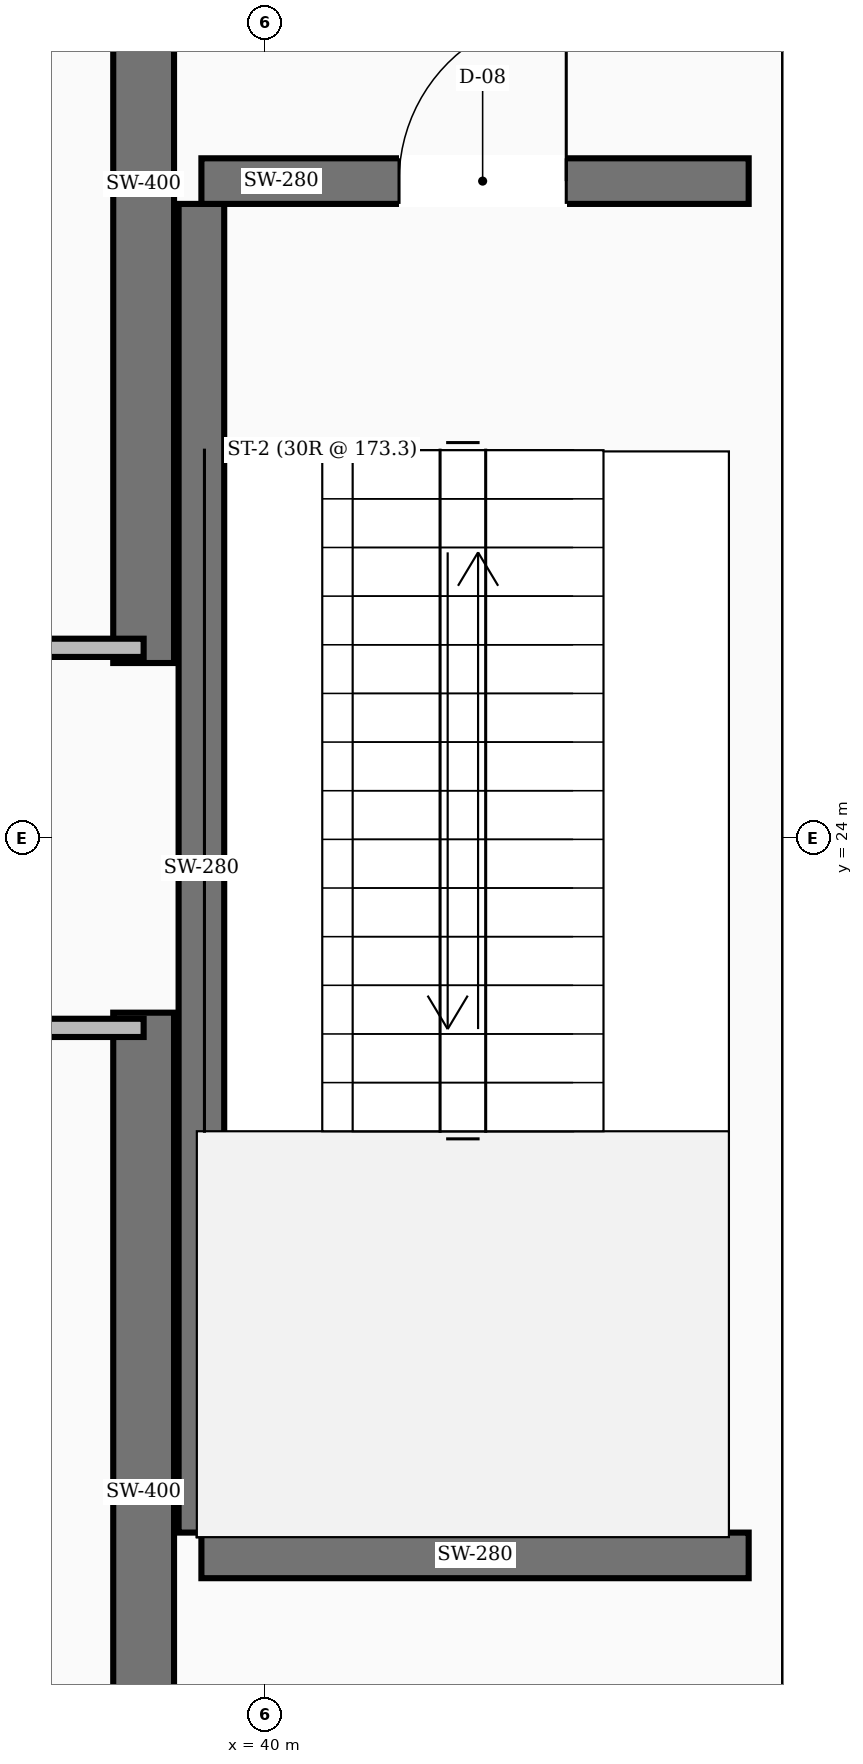
"""IFC4 building model, lengths in metres.
Left out: names, types, materials, properties, quantities, classifications, styles, units other than length and angle.
Written with IfcOpenShell. Run it as: python <this file> out.ifc"""

import sys

from ifc_helpers import new_model, si_unit, direction, frame, frame_2d, origin, place, context, subcontext, project, spatial, rectangle, extrude, element, fill, save


model = new_model("IFC4")
c1 = context("Model", 3, precision=1e-05, world=origin(), true_north=direction((0.0, 1.0)))
c2 = subcontext(c1, "Body", "Model", "MODEL_VIEW")
j1 = project(units=[si_unit("LENGTHUNIT", "METRE"), si_unit("PLANEANGLEUNIT", "RADIAN")], contexts=[c1])
p1 = place(None, origin())
s1 = spatial("IfcSite", under=j1, at=p1, CompositionType="ELEMENT")
p2 = place(p1, origin())
s2 = spatial("IfcBuilding", under=s1, at=p2, CompositionType="ELEMENT")
p3 = place(p2, frame((0.0, 0.0, -10.4)))
s3 = spatial("IfcBuildingStorey", under=s2, at=p3, CompositionType="ELEMENT", Elevation=-10.4)
for number, where, z_axis, x_axis in (
    (1, (39.2, 16.55, 0.0), (0.0, 0.0, 1.0), (0.0, 1.0, 0.0)),
    (2, (39.2, 25.15, 0.0), (0.0, 0.0, 1.0), (0.0, 1.0, 0.0)),
):
    element("IfcWall", number, at=place(p3, frame(where, z_axis=z_axis, x_axis=x_axis)), inside=s3, PredefinedType="SHEAR", context=c2, shape_type="SweptSolid", body=[
        extrude(rectangle(XDim=6.3, YDim=0.4, at=frame_2d((3.15, 0.0))), origin(), (0.0, 0.0, 1.0), 5.2),
    ])
for number, where, z_axis, x_axis in (
    (3, (43.18, 19.43, 0.0), (0.0, 0.0, 1.0), (0.0, 1.0, 0.0)),
    (4, (39.58, 19.43, 0.0), (0.0, 0.0, 1.0), (0.0, 1.0, 0.0)),
):
    element("IfcWall", number, at=place(p3, frame(where, z_axis=z_axis, x_axis=x_axis)), inside=s3, PredefinedType="SHEAR", context=c2, shape_type="SweptSolid", body=[
        extrude(rectangle(XDim=8.74, YDim=0.3, at=frame_2d((4.37, 0.0))), origin(), (0.0, 0.0, 1.0), 5.2),
    ])
p4 = place(p3, frame((39.58, 19.28, 0.0), z_axis=(0.0, 0.0, 1.0), x_axis=(1.0, 0.0, 0.0)))
e5 = element("IfcWall", 5, at=p4, inside=s3, PredefinedType="SHEAR", context=c2, shape_type="SweptSolid", body=[
    extrude(rectangle(XDim=3.6, YDim=0.3, at=frame_2d((1.8, 0.0))), origin(), (0.0, 0.0, 1.0), 5.2),
])
p5 = place(p3, frame((39.58, 28.32, 0.0), z_axis=(0.0, 0.0, 1.0), x_axis=(1.0, 0.0, 0.0)))
e6 = element("IfcWall", 6, at=p5, inside=s3, PredefinedType="SHEAR", context=c2, shape_type="SweptSolid", body=[
    extrude(rectangle(XDim=3.6, YDim=0.3, at=frame_2d((1.8, 0.0))), origin(), (0.0, 0.0, 1.0), 5.2),
])
p6 = place(p5, frame((1.3, 0.0, 0.0)))
e7 = element("IfcOpeningElement", 7, at=p6, cuts=e6, PredefinedType="OPENING", context=c2, shape_type="SweptSolid", body=[
    extrude(rectangle(XDim=1.1, YDim=2.1, at=frame_2d((0.55, 1.05))), frame((0.0, 0.16, 0.0), z_axis=(0.0, -1.0, 0.0), x_axis=(1.0, 0.0, 0.0)), (0.0, 0.0, 1.0), 0.32),
])
p7 = place(p3, frame((43.18, 28.32, 0.0), z_axis=(0.0, 0.0, 1.0), x_axis=(0.0, 1.0, 0.0)))
e8 = element("IfcWall", 8, at=p7, inside=s3, PredefinedType="SOLIDWALL", context=c2, shape_type="SweptSolid", body=[
    extrude(rectangle(XDim=3.13, YDim=0.2, at=frame_2d((1.565, 0.0))), origin(), (0.0, 0.0, 1.0), 3.9),
])
p8 = place(p7, frame((1.015, 0.0, 0.0)))
e9 = element("IfcOpeningElement", 9, at=p8, cuts=e8, PredefinedType="OPENING", context=c2, shape_type="SweptSolid", body=[
    extrude(rectangle(XDim=1.1, YDim=2.1, at=frame_2d((0.55, 1.05))), frame((0.0, 0.11, 0.0), z_axis=(0.0, -1.0, 0.0), x_axis=(1.0, 0.0, 0.0)), (0.0, 0.0, 1.0), 0.22),
])
p9 = place(p3, frame((43.18, 16.55, 0.0), z_axis=(0.0, 0.0, 1.0), x_axis=(0.0, 1.0, 0.0)))
e10 = element("IfcWall", 10, at=p9, inside=s3, PredefinedType="SOLIDWALL", context=c2, shape_type="SweptSolid", body=[
    extrude(rectangle(XDim=2.73, YDim=0.2, at=frame_2d((1.365, 0.0))), origin(), (0.0, 0.0, 1.0), 3.9),
])
p10 = place(p9, frame((0.89, 0.0, 0.0)))
e11 = element("IfcOpeningElement", 11, at=p10, cuts=e10, PredefinedType="OPENING", context=c2, shape_type="SweptSolid", body=[
    extrude(rectangle(XDim=0.95, YDim=2.1, at=frame_2d((0.475, 1.05))), frame((0.0, 0.11, 0.0), z_axis=(0.0, -1.0, 0.0), x_axis=(1.0, 0.0, 0.0)), (0.0, 0.0, 1.0), 0.22),
])
for number, where, z_axis, x_axis in (
    (12, (37.4, 25.25, 0.0), (0.0, 0.0, 1.0), (1.0, 0.0, 0.0)),
    (13, (37.4, 22.75, 0.0), (0.0, 0.0, 1.0), (1.0, 0.0, 0.0)),
):
    element("IfcWall", number, at=place(p3, frame(where, z_axis=z_axis, x_axis=x_axis)), inside=s3, PredefinedType="PARTITIONING", context=c2, shape_type="SweptSolid", body=[
        extrude(rectangle(XDim=1.8, YDim=0.12, at=frame_2d((0.9, 0.0))), origin(), (0.0, 0.0, 1.0), 3.9),
    ])
p11 = place(p6, origin())
e14 = element("IfcDoor", 14, at=p11, inside=s3, OperationType="SINGLE_SWING_RIGHT", PredefinedType="DOOR", context=c2, shape_type="SweptSolid", body=[
    extrude(rectangle(XDim=1.1, YDim=2.1, at=frame_2d((0.55, 1.05))), frame((0.0, 0.025, 0.0), z_axis=(0.0, -1.0, 0.0), x_axis=(1.0, 0.0, 0.0)), (0.0, 0.0, 1.0), 0.05),
])
fill(e7, e14)
save(model, sys.argv[1])
